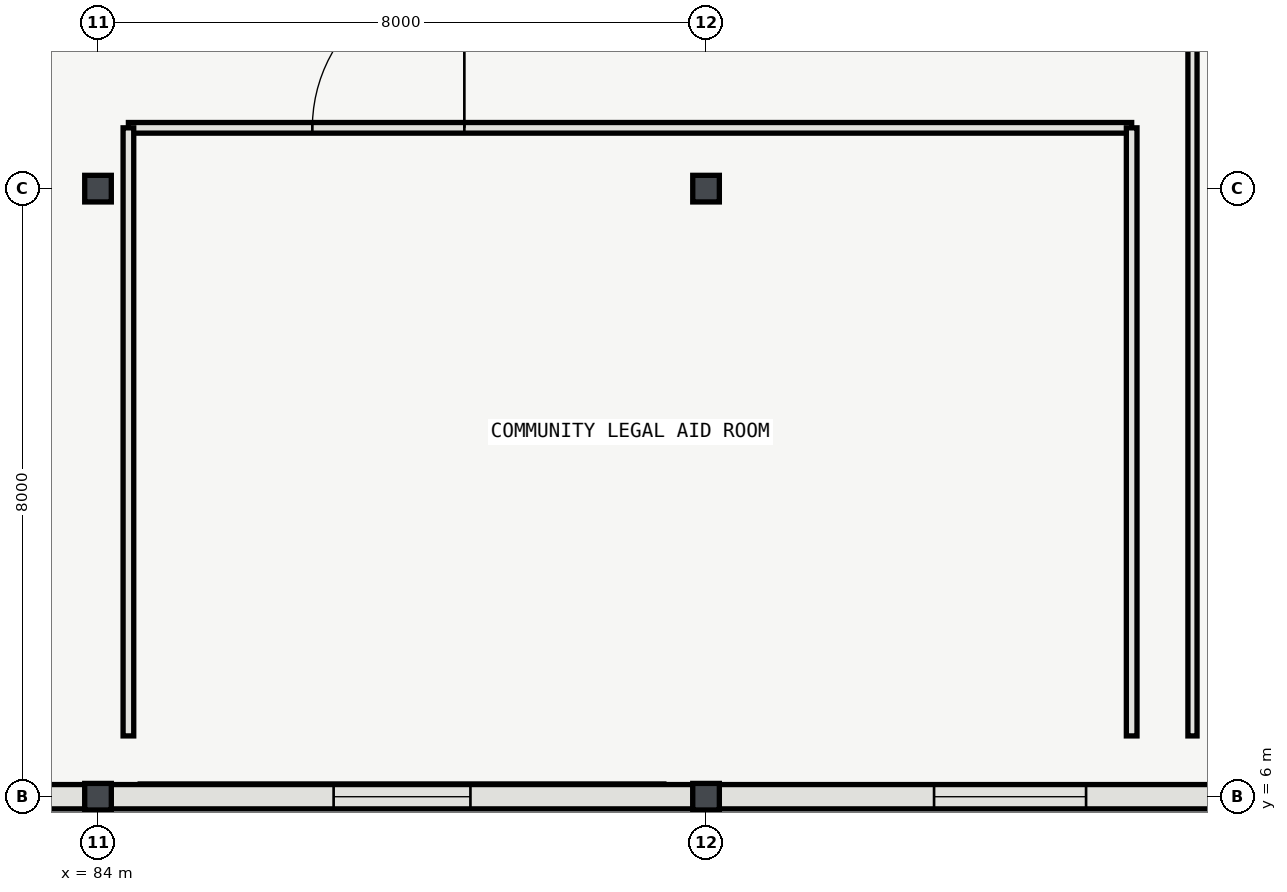
"""IFC4 building model, lengths in metres.
Left out: names, types, materials, properties, quantities, classifications, styles, units other than length and angle.
Written with IfcOpenShell. Run it as: python <this file> out.ifc"""

import sys

from ifc_helpers import new_model, si_unit, direction, frame, frame_2d, origin, origin_2d, place, context, subcontext, project, spatial, rectangle, i_section, extrude, element, fill, save


model = new_model("IFC4")
c1 = context("Model", 3, precision=1e-05, world=origin(), true_north=direction((0.0, 1.0)))
c2 = subcontext(c1, "Body", "Model", "MODEL_VIEW")
j1 = project(units=[si_unit("LENGTHUNIT", "METRE"), si_unit("PLANEANGLEUNIT", "RADIAN")], contexts=[c1])
p1 = place(None, origin())
s1 = spatial("IfcSite", under=j1, at=p1, CompositionType="ELEMENT")
p2 = place(p1, origin())
s2 = spatial("IfcBuilding", under=s1, at=p2, CompositionType="ELEMENT")
p3 = place(p2, origin())
s3 = spatial("IfcBuildingStorey", under=s2, at=p3, CompositionType="ELEMENT", Elevation=0.0)
for number, where, z_axis, x_axis in (
    (1, (84.0, 6.0, 0.0), (0.0, 0.0, 1.0), (1.0, 0.0, 0.0)),
    (2, (84.0, 14.0, 0.0), (0.0, 0.0, 1.0), (1.0, 0.0, 0.0)),
    (3, (92.0, 6.0, 0.0), (0.0, 0.0, 1.0), (1.0, 0.0, 0.0)),
    (4, (92.0, 14.0, 0.0), (0.0, 0.0, 1.0), (1.0, 0.0, 0.0)),
):
    element("IfcColumn", number, at=place(p3, frame(where, z_axis=z_axis, x_axis=x_axis)), inside=s3, PredefinedType="COLUMN", context=c2, shape_type="SweptSolid", body=[
        extrude(i_section(OverallWidth=0.35, OverallDepth=0.35, WebThickness=0.012, FlangeThickness=0.019, FilletRadius=0.02, at=origin_2d()), origin(), (0.0, 0.0, 1.0), 5.4),
    ])
p4 = place(p3, frame((76.171, 6.0, 0.0), z_axis=(0.0, 0.0, 1.0), x_axis=(1.0, 0.0, 0.0)))
e5 = element("IfcWall", 5, at=p4, inside=s3, PredefinedType="SOLIDWALL", context=c2, shape_type="SweptSolid", body=[
    extrude(rectangle(XDim=7.658, YDim=0.32, at=frame_2d((3.829, 0.0))), origin(), (0.0, 0.0, 1.0), 4.683),
])
p5 = place(p4, frame((1.099, 0.0, 0.0)))
e6 = element("IfcOpeningElement", 6, at=p5, cuts=e5, PredefinedType="OPENING", context=c2, shape_type="SweptSolid", body=[
    extrude(rectangle(XDim=2.2, YDim=2.4, at=frame_2d((1.1, 1.2))), frame((0.0, 0.17, 0.0), z_axis=(0.0, -1.0, 0.0), x_axis=(1.0, 0.0, 0.0)), (0.0, 0.0, 1.0), 0.34),
])
p6 = place(p4, frame((4.359, 0.0, 0.0)))
e7 = element("IfcOpeningElement", 7, at=p6, cuts=e5, PredefinedType="OPENING", context=c2, shape_type="SweptSolid", body=[
    extrude(rectangle(XDim=2.0, YDim=2.35, at=frame_2d((1.0, 1.175))), frame((0.0, 0.17, 0.0), z_axis=(0.0, -1.0, 0.0), x_axis=(1.0, 0.0, 0.0)), (0.0, 0.0, 1.0), 0.34),
])
p7 = place(p3, frame((84.171, 6.0, 0.0), z_axis=(0.0, 0.0, 1.0), x_axis=(1.0, 0.0, 0.0)))
e8 = element("IfcWall", 8, at=p7, inside=s3, PredefinedType="SOLIDWALL", context=c2, shape_type="SweptSolid", body=[
    extrude(rectangle(XDim=7.658, YDim=0.32, at=frame_2d((3.829, 0.0))), origin(), (0.0, 0.0, 1.0), 3.088),
])
p8 = place(p7, frame((2.929, 0.0, 0.95)))
e9 = element("IfcOpeningElement", 9, at=p8, cuts=e8, PredefinedType="OPENING", context=c2, shape_type="SweptSolid", body=[
    extrude(rectangle(XDim=1.8, YDim=1.5, at=frame_2d((0.9, 0.75))), frame((0.0, 0.17, 0.0), z_axis=(0.0, -1.0, 0.0), x_axis=(1.0, 0.0, 0.0)), (0.0, 0.0, 1.0), 0.34),
])
p9 = place(p3, frame((92.171, 6.0, 0.0), z_axis=(0.0, 0.0, 1.0), x_axis=(1.0, 0.0, 0.0)))
e10 = element("IfcWall", 10, at=p9, inside=s3, PredefinedType="SOLIDWALL", context=c2, shape_type="SweptSolid", body=[
    extrude(rectangle(XDim=7.658, YDim=0.32, at=frame_2d((3.829, 0.0))), origin(), (0.0, 0.0, 1.0), 4.683),
])
p10 = place(p9, frame((2.829, 0.0, 0.95)))
e11 = element("IfcOpeningElement", 11, at=p10, cuts=e10, PredefinedType="OPENING", context=c2, shape_type="SweptSolid", body=[
    extrude(rectangle(XDim=2.0, YDim=1.8, at=frame_2d((1.0, 0.9))), frame((0.0, 0.17, 0.0), z_axis=(0.0, -1.0, 0.0), x_axis=(1.0, 0.0, 0.0)), (0.0, 0.0, 1.0), 0.34),
])
p11 = place(p3, frame((97.6, 14.8, 0.0), z_axis=(0.0, 0.0, 1.0), x_axis=(-1.0, 0.0, 0.0)))
e12 = element("IfcWall", 12, at=p11, inside=s3, PredefinedType="PARTITIONING", context=c2, shape_type="SweptSolid", body=[
    extrude(rectangle(XDim=13.2, YDim=0.14, at=frame_2d((6.6, 0.0))), origin(), (0.0, 0.0, 1.0), 5.12),
])
p12 = place(p11, frame((8.78, 0.0, 0.0)))
e13 = element("IfcOpeningElement", 13, at=p12, cuts=e12, PredefinedType="OPENING", context=c2, shape_type="SweptSolid", body=[
    extrude(rectangle(XDim=2.0, YDim=2.4, at=frame_2d((1.0, 1.2))), frame((0.0, 0.08, 0.0), z_axis=(0.0, -1.0, 0.0), x_axis=(1.0, 0.0, 0.0)), (0.0, 0.0, 1.0), 0.16),
])
for number, where, z_axis, x_axis in (
    (14, (84.4, 14.8, 0.0), (0.0, 0.0, 1.0), (0.0, -1.0, 0.0)),
    (15, (97.6, 6.8, 0.0), (0.0, 0.0, 1.0), (0.0, 1.0, 0.0)),
):
    element("IfcWall", number, at=place(p3, frame(where, z_axis=z_axis, x_axis=x_axis)), inside=s3, PredefinedType="PARTITIONING", context=c2, shape_type="SweptSolid", body=[
        extrude(rectangle(XDim=8.0, YDim=0.14, at=frame_2d((4.0, 0.0))), origin(), (0.0, 0.0, 1.0), 5.12),
    ])
p13 = place(p3, frame((98.4, 18.6, 0.0), z_axis=(0.0, 0.0, 1.0), x_axis=(0.0, -1.0, 0.0)))
e16 = element("IfcWall", 16, at=p13, inside=s3, PredefinedType="PARTITIONING", context=c2, shape_type="SweptSolid", body=[
    extrude(rectangle(XDim=11.8, YDim=0.12, at=frame_2d((5.9, 0.0))), origin(), (0.0, 0.0, 1.0), 5.12),
])
p14 = place(p8, origin())
e17 = element("IfcWindow", 17, at=p14, inside=s3, PartitioningType="SINGLE_PANEL", PredefinedType="WINDOW", context=c2, shape_type="SweptSolid", body=[
    extrude(rectangle(XDim=1.8, YDim=1.5, at=frame_2d((0.9, 0.75))), frame((0.0, 0.03, 0.0), z_axis=(0.0, -1.0, 0.0), x_axis=(1.0, 0.0, 0.0)), (0.0, 0.0, 1.0), 0.06),
])
fill(e9, e17)
p15 = place(p10, origin())
e18 = element("IfcWindow", 18, at=p15, inside=s3, PartitioningType="SINGLE_PANEL", PredefinedType="WINDOW", context=c2, shape_type="SweptSolid", body=[
    extrude(rectangle(XDim=2.0, YDim=1.8, at=frame_2d((1.0, 0.9))), frame((0.0, 0.03, 0.0), z_axis=(0.0, -1.0, 0.0), x_axis=(1.0, 0.0, 0.0)), (0.0, 0.0, 1.0), 0.06),
])
fill(e11, e18)
p16 = place(p12, origin())
e19 = element("IfcDoor", 19, at=p16, inside=s3, OperationType="DOUBLE_DOOR_SINGLE_SWING", PredefinedType="DOOR", context=c2, shape_type="SweptSolid", body=[
    extrude(rectangle(XDim=2.0, YDim=2.4, at=frame_2d((1.0, 1.2))), frame((0.0, 0.025, 0.0), z_axis=(0.0, -1.0, 0.0), x_axis=(1.0, 0.0, 0.0)), (0.0, 0.0, 1.0), 0.05),
])
fill(e13, e19)
save(model, sys.argv[1])
